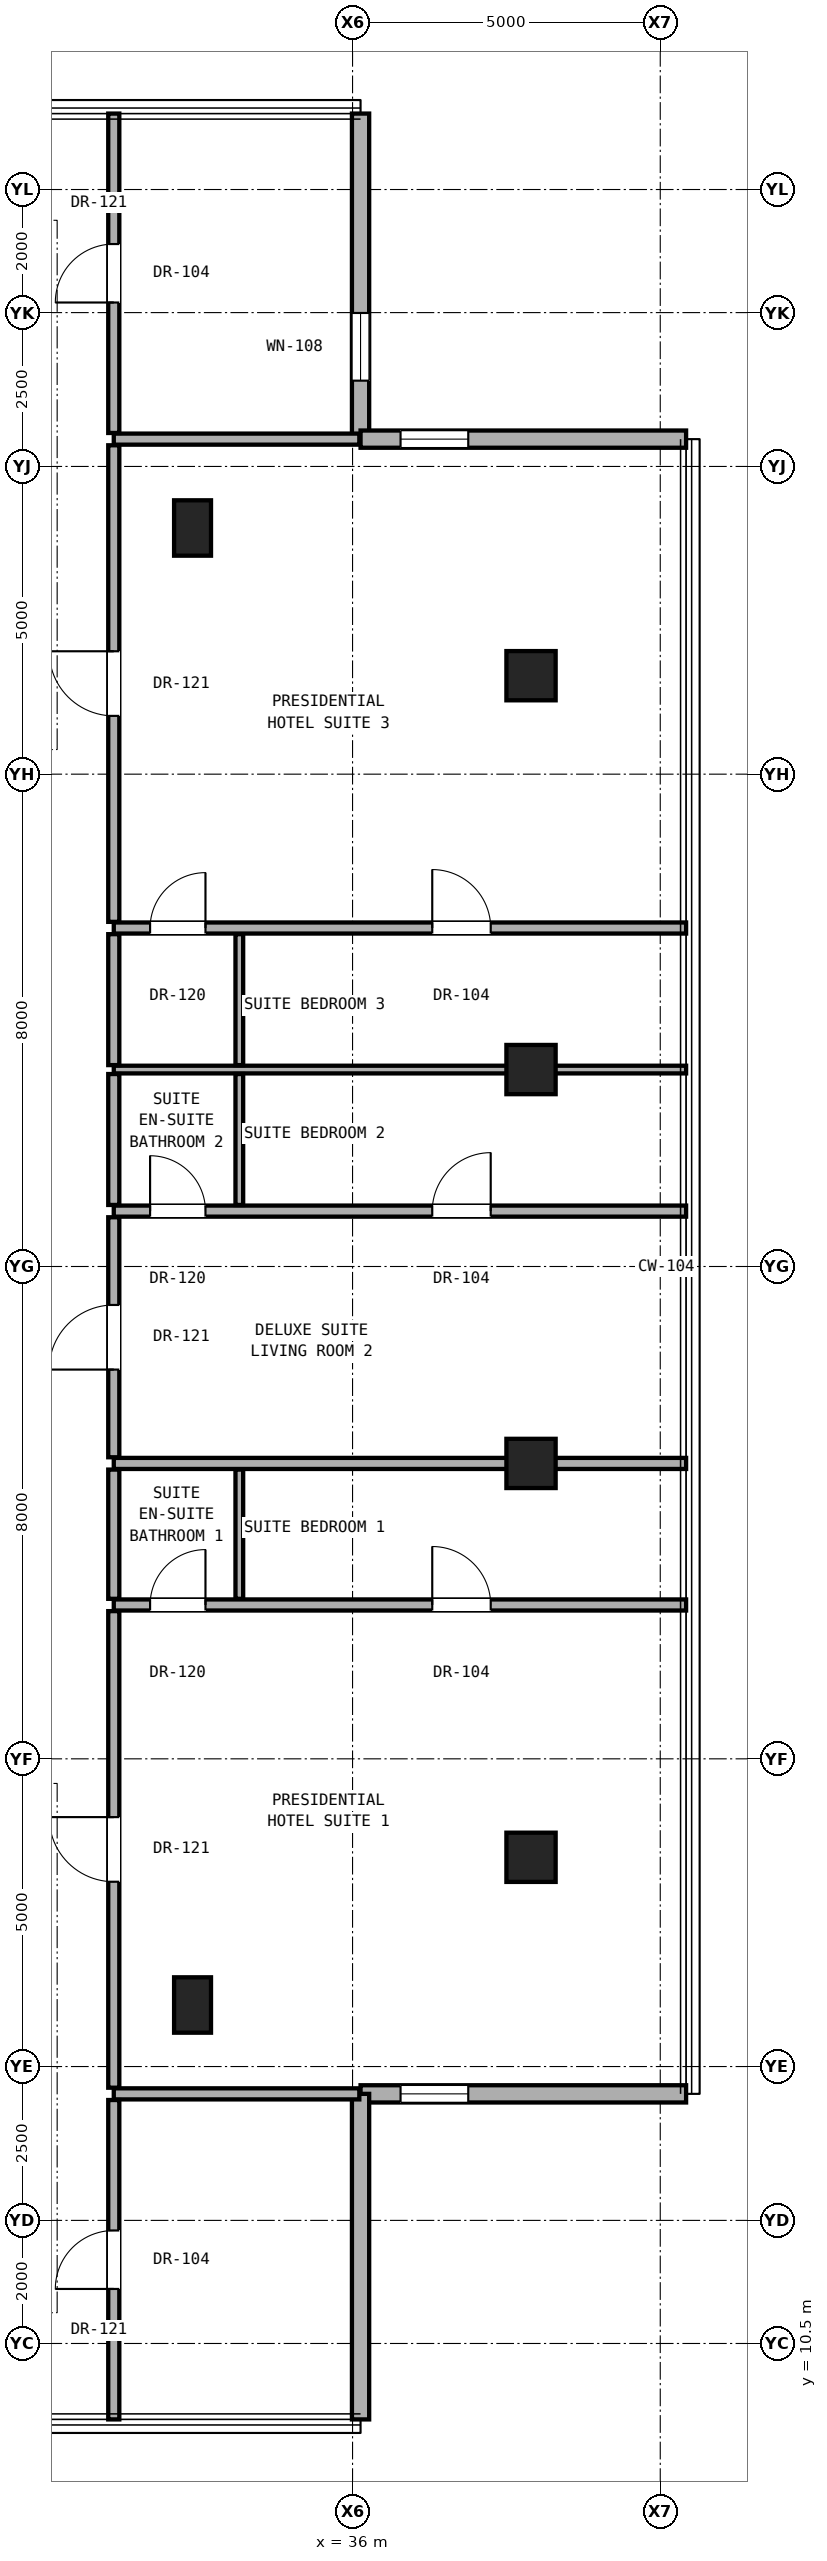
"""IFC4 building model, lengths in metres.
Left out: names, types, materials, properties, quantities, classifications, styles, units other than length and angle.
Written with IfcOpenShell. Run it as: python <this file> out.ifc"""

import sys

from ifc_helpers import new_model, si_unit, direction, frame, frame_2d, origin, origin_2d, place, context, subcontext, project, spatial, rectangle, hollow_rectangle, extrude, element, fill, save


model = new_model("IFC4")
c1 = context("Model", 3, precision=1e-05, world=origin(), true_north=direction((0.0, 1.0)))
c2 = subcontext(c1, "Body", "Model", "MODEL_VIEW")
j1 = project(units=[si_unit("LENGTHUNIT", "METRE"), si_unit("PLANEANGLEUNIT", "RADIAN")], contexts=[c1])
p1 = place(None, origin())
s1 = spatial("IfcSite", under=j1, at=p1, CompositionType="ELEMENT")
p2 = place(p1, origin())
s2 = spatial("IfcBuilding", under=s1, at=p2, CompositionType="ELEMENT")
p3 = place(p2, frame((0.0, 0.0, 229.3)))
s3 = spatial("IfcBuildingStorey", under=s2, at=p3, CompositionType="ELEMENT", Elevation=229.3)
for number, where, z_axis, x_axis in (
    (1, (38.9, 18.4, 0.0), (0.0, 0.0, 1.0), (1.0, 0.0, 0.0)),
    (2, (38.9, 24.8, 0.0), (0.0, 0.0, 1.0), (1.0, 0.0, 0.0)),
    (3, (38.9, 31.2, 0.0), (0.0, 0.0, 1.0), (1.0, 0.0, 0.0)),
    (4, (38.9, 37.6, 0.0), (0.0, 0.0, 1.0), (1.0, 0.0, 0.0)),
):
    element("IfcColumn", number, at=place(p3, frame(where, z_axis=z_axis, x_axis=x_axis)), inside=s3, PredefinedType="COLUMN", context=c2, shape_type="SweptSolid", body=[
        extrude(hollow_rectangle(XDim=0.8, YDim=0.8, WallThickness=0.045, at=origin_2d()), origin(), (0.0, 0.0, 1.0), 3.3),
    ])
for number, where, z_axis, x_axis in (
    (5, (33.4, 16.0, 0.0), (0.0, 0.0, 1.0), (1.0, 0.0, 0.0)),
    (6, (33.4, 40.0, 0.0), (0.0, 0.0, 1.0), (1.0, 0.0, 0.0)),
):
    element("IfcColumn", number, at=place(p3, frame(where, z_axis=z_axis, x_axis=x_axis)), inside=s3, PredefinedType="PILASTER", context=c2, shape_type="SweptSolid", body=[
        extrude(rectangle(XDim=0.6, YDim=0.9, at=origin_2d()), origin(), (0.0, 0.0, 1.0), 3.3),
    ])
p4 = place(p3, frame((36.13, 41.444, 0.0), z_axis=(0.0, 0.0, 1.0), x_axis=(0.0, 1.0, 0.0)))
e7 = element("IfcWall", 7, at=p4, inside=s3, PredefinedType="SOLIDWALL", context=c2, shape_type="SweptSolid", body=[
    extrude(rectangle(XDim=5.29, YDim=0.28, at=frame_2d((2.645, 0.0))), origin(), (0.0, 0.0, 1.0), 3.08),
])
p5 = place(p4, frame((0.95, 0.0, 0.85)))
e8 = element("IfcOpeningElement", 8, at=p5, cuts=e7, PredefinedType="OPENING", context=c2, shape_type="SweptSolid", body=[
    extrude(rectangle(XDim=1.1, YDim=2.0, at=frame_2d((0.55, 1.0))), frame((0.0, 0.15, 0.0), z_axis=(0.0, -1.0, 0.0), x_axis=(1.0, 0.0, 0.0)), (0.0, 0.0, 1.0), 0.3),
])
p6 = place(p3, frame((36.13, 14.556, 0.0), z_axis=(0.0, 0.0, 1.0), x_axis=(1.0, 0.0, 0.0)))
e9 = element("IfcWall", 9, at=p6, inside=s3, PredefinedType="SOLIDWALL", context=c2, shape_type="SweptSolid", body=[
    extrude(rectangle(XDim=5.29, YDim=0.28, at=frame_2d((2.645, 0.0))), origin(), (0.0, 0.0, 1.0), 3.08),
])
p7 = place(p6, frame((0.65, 0.0, 0.85)))
e10 = element("IfcOpeningElement", 10, at=p7, cuts=e9, PredefinedType="OPENING", context=c2, shape_type="SweptSolid", body=[
    extrude(rectangle(XDim=1.1, YDim=2.0, at=frame_2d((0.55, 1.0))), frame((0.0, 0.15, 0.0), z_axis=(0.0, -1.0, 0.0), x_axis=(1.0, 0.0, 0.0)), (0.0, 0.0, 1.0), 0.3),
])
p8 = place(p3, frame((36.13, 9.266, 0.0), z_axis=(0.0, 0.0, 1.0), x_axis=(0.0, 1.0, 0.0)))
e11 = element("IfcWall", 11, at=p8, inside=s3, PredefinedType="SOLIDWALL", context=c2, shape_type="SweptSolid", body=[
    extrude(rectangle(XDim=5.29, YDim=0.28, at=frame_2d((2.645, 0.0))), origin(), (0.0, 0.0, 1.0), 3.08),
])
p9 = place(p3, frame((41.42, 41.444, 0.0), z_axis=(0.0, 0.0, 1.0), x_axis=(-1.0, 0.0, 0.0)))
e12 = element("IfcWall", 12, at=p9, inside=s3, PredefinedType="SOLIDWALL", context=c2, shape_type="SweptSolid", body=[
    extrude(rectangle(XDim=5.29, YDim=0.28, at=frame_2d((2.645, 0.0))), origin(), (0.0, 0.0, 1.0), 3.08),
])
p10 = place(p9, frame((3.54, 0.0, 0.85)))
e13 = element("IfcOpeningElement", 13, at=p10, cuts=e12, PredefinedType="OPENING", context=c2, shape_type="SweptSolid", body=[
    extrude(rectangle(XDim=1.1, YDim=2.0, at=frame_2d((0.55, 1.0))), frame((0.0, 0.15, 0.0), z_axis=(0.0, -1.0, 0.0), x_axis=(1.0, 0.0, 0.0)), (0.0, 0.0, 1.0), 0.3),
])
p11 = place(p3, frame((32.12, 14.556, 0.0), z_axis=(0.0, 0.0, 1.0), x_axis=(1.0, 0.0, 0.0)))
e14 = element("IfcWall", 14, at=p11, inside=s3, PredefinedType="PARTITIONING", context=c2, shape_type="SweptSolid", body=[
    extrude(rectangle(XDim=3.99, YDim=0.18, at=frame_2d((1.995, 0.0))), origin(), (0.0, 0.0, 1.0), 3.1),
])
p12 = place(p3, frame((32.12, 22.5, 0.0), z_axis=(0.0, 0.0, 1.0), x_axis=(1.0, 0.0, 0.0)))
e15 = element("IfcWall", 15, at=p12, inside=s3, PredefinedType="PARTITIONING", context=c2, shape_type="SweptSolid", body=[
    extrude(rectangle(XDim=9.3, YDim=0.18, at=frame_2d((4.65, 0.0))), origin(), (0.0, 0.0, 1.0), 2.319),
])
p13 = place(p12, frame((5.175, 0.0, 0.0)))
e16 = element("IfcOpeningElement", 16, at=p13, cuts=e15, PredefinedType="OPENING", context=c2, shape_type="SweptSolid", body=[
    extrude(rectangle(XDim=0.95, YDim=2.15, at=frame_2d((0.475, 1.075))), frame((0.0, 0.1, 0.0), z_axis=(0.0, -1.0, 0.0), x_axis=(1.0, 0.0, 0.0)), (0.0, 0.0, 1.0), 0.2),
])
p14 = place(p12, frame((0.59, 0.0, 0.0)))
e17 = element("IfcOpeningElement", 17, at=p14, cuts=e15, PredefinedType="OPENING", context=c2, shape_type="SweptSolid", body=[
    extrude(rectangle(XDim=0.9, YDim=2.1, at=frame_2d((0.45, 1.05))), frame((0.0, 0.1, 0.0), z_axis=(0.0, -1.0, 0.0), x_axis=(1.0, 0.0, 0.0)), (0.0, 0.0, 1.0), 0.2),
])
p15 = place(p3, frame((32.12, 24.8, 0.0), z_axis=(0.0, 0.0, 1.0), x_axis=(1.0, 0.0, 0.0)))
e18 = element("IfcWall", 18, at=p15, inside=s3, PredefinedType="PARTITIONING", context=c2, shape_type="SweptSolid", body=[
    extrude(rectangle(XDim=9.3, YDim=0.18, at=frame_2d((4.65, 0.0))), origin(), (0.0, 0.0, 1.0), 2.319),
])
p16 = place(p3, frame((32.12, 28.9, 0.0), z_axis=(0.0, 0.0, 1.0), x_axis=(1.0, 0.0, 0.0)))
e19 = element("IfcWall", 19, at=p16, inside=s3, PredefinedType="PARTITIONING", context=c2, shape_type="SweptSolid", body=[
    extrude(rectangle(XDim=9.3, YDim=0.18, at=frame_2d((4.65, 0.0))), origin(), (0.0, 0.0, 1.0), 2.319),
])
p17 = place(p16, frame((5.175, 0.0, 0.0)))
e20 = element("IfcOpeningElement", 20, at=p17, cuts=e19, PredefinedType="OPENING", context=c2, shape_type="SweptSolid", body=[
    extrude(rectangle(XDim=0.95, YDim=2.15, at=frame_2d((0.475, 1.075))), frame((0.0, 0.1, 0.0), z_axis=(0.0, -1.0, 0.0), x_axis=(1.0, 0.0, 0.0)), (0.0, 0.0, 1.0), 0.2),
])
p18 = place(p16, frame((0.59, 0.0, 0.0)))
e21 = element("IfcOpeningElement", 21, at=p18, cuts=e19, PredefinedType="OPENING", context=c2, shape_type="SweptSolid", body=[
    extrude(rectangle(XDim=0.9, YDim=2.1, at=frame_2d((0.45, 1.05))), frame((0.0, 0.1, 0.0), z_axis=(0.0, -1.0, 0.0), x_axis=(1.0, 0.0, 0.0)), (0.0, 0.0, 1.0), 0.2),
])
p19 = place(p3, frame((32.12, 31.2, 0.0), z_axis=(0.0, 0.0, 1.0), x_axis=(1.0, 0.0, 0.0)))
e22 = element("IfcWall", 22, at=p19, inside=s3, PredefinedType="PARTITIONING", context=c2, shape_type="SweptSolid", body=[
    extrude(rectangle(XDim=9.3, YDim=0.125, at=frame_2d((4.65, 0.0))), origin(), (0.0, 0.0, 1.0), 2.319),
])
p20 = place(p3, frame((32.12, 33.5, 0.0), z_axis=(0.0, 0.0, 1.0), x_axis=(1.0, 0.0, 0.0)))
e23 = element("IfcWall", 23, at=p20, inside=s3, PredefinedType="PARTITIONING", context=c2, shape_type="SweptSolid", body=[
    extrude(rectangle(XDim=9.3, YDim=0.18, at=frame_2d((4.65, 0.0))), origin(), (0.0, 0.0, 1.0), 2.319),
])
p21 = place(p20, frame((5.175, 0.0, 0.0)))
e24 = element("IfcOpeningElement", 24, at=p21, cuts=e23, PredefinedType="OPENING", context=c2, shape_type="SweptSolid", body=[
    extrude(rectangle(XDim=0.95, YDim=2.15, at=frame_2d((0.475, 1.075))), frame((0.0, 0.1, 0.0), z_axis=(0.0, -1.0, 0.0), x_axis=(1.0, 0.0, 0.0)), (0.0, 0.0, 1.0), 0.2),
])
p22 = place(p20, frame((0.59, 0.0, 0.0)))
e25 = element("IfcOpeningElement", 25, at=p22, cuts=e23, PredefinedType="OPENING", context=c2, shape_type="SweptSolid", body=[
    extrude(rectangle(XDim=0.9, YDim=2.1, at=frame_2d((0.45, 1.05))), frame((0.0, 0.1, 0.0), z_axis=(0.0, -1.0, 0.0), x_axis=(1.0, 0.0, 0.0)), (0.0, 0.0, 1.0), 0.2),
])
p23 = place(p3, frame((32.12, 41.444, 0.0), z_axis=(0.0, 0.0, 1.0), x_axis=(1.0, 0.0, 0.0)))
e26 = element("IfcWall", 26, at=p23, inside=s3, PredefinedType="PARTITIONING", context=c2, shape_type="SweptSolid", body=[
    extrude(rectangle(XDim=3.99, YDim=0.18, at=frame_2d((1.995, 0.0))), origin(), (0.0, 0.0, 1.0), 3.1),
])
p24 = place(p3, frame((32.12, 9.266, 0.0), z_axis=(0.0, 0.0, 1.0), x_axis=(0.0, 1.0, 0.0)))
e27 = element("IfcWall", 27, at=p24, inside=s3, PredefinedType="PARTITIONING", context=c2, shape_type="SweptSolid", body=[
    extrude(rectangle(XDim=5.19, YDim=0.18, at=frame_2d((2.595, 0.0))), origin(), (0.0, 0.0, 1.0), 3.1),
])
p25 = place(p24, frame((2.12, 0.0, 0.0)))
e28 = element("IfcOpeningElement", 28, at=p25, cuts=e27, PredefinedType="OPENING", context=c2, shape_type="SweptSolid", body=[
    extrude(rectangle(XDim=0.95, YDim=2.15, at=frame_2d((0.475, 1.075))), frame((0.0, 0.1, 0.0), z_axis=(0.0, -1.0, 0.0), x_axis=(1.0, 0.0, 0.0)), (0.0, 0.0, 1.0), 0.2),
])
p26 = place(p3, frame((32.12, 14.656, 0.0), z_axis=(0.0, 0.0, 1.0), x_axis=(0.0, 1.0, 0.0)))
e29 = element("IfcWall", 29, at=p26, inside=s3, PredefinedType="PARTITIONING", context=c2, shape_type="SweptSolid", body=[
    extrude(rectangle(XDim=7.744, YDim=0.18, at=frame_2d((3.872, 0.0))), origin(), (0.0, 0.0, 1.0), 2.492),
])
p27 = place(p26, frame((3.347, 0.0, 0.0)))
e30 = element("IfcOpeningElement", 30, at=p27, cuts=e29, PredefinedType="OPENING", context=c2, shape_type="SweptSolid", body=[
    extrude(rectangle(XDim=1.05, YDim=2.2, at=frame_2d((0.525, 1.1))), frame((0.0, 0.1, 0.0), z_axis=(0.0, -1.0, 0.0), x_axis=(1.0, 0.0, 0.0)), (0.0, 0.0, 1.0), 0.2),
])
p28 = place(p3, frame((32.12, 22.6, 0.0), z_axis=(0.0, 0.0, 1.0), x_axis=(0.0, 1.0, 0.0)))
e31 = element("IfcWall", 31, at=p28, inside=s3, PredefinedType="PARTITIONING", context=c2, shape_type="SweptSolid", body=[
    extrude(rectangle(XDim=2.1, YDim=0.18, at=frame_2d((1.05, 0.0))), origin(), (0.0, 0.0, 1.0), 2.396),
])
p29 = place(p3, frame((32.12, 24.9, 0.0), z_axis=(0.0, 0.0, 1.0), x_axis=(0.0, 1.0, 0.0)))
e32 = element("IfcWall", 32, at=p29, inside=s3, PredefinedType="PARTITIONING", context=c2, shape_type="SweptSolid", body=[
    extrude(rectangle(XDim=3.9, YDim=0.18, at=frame_2d((1.95, 0.0))), origin(), (0.0, 0.0, 1.0), 2.396),
])
p30 = place(p29, frame((1.425, 0.0, 0.0)))
e33 = element("IfcOpeningElement", 33, at=p30, cuts=e32, PredefinedType="OPENING", context=c2, shape_type="SweptSolid", body=[
    extrude(rectangle(XDim=1.05, YDim=2.2, at=frame_2d((0.525, 1.1))), frame((0.0, 0.1, 0.0), z_axis=(0.0, -1.0, 0.0), x_axis=(1.0, 0.0, 0.0)), (0.0, 0.0, 1.0), 0.2),
])
for number, where, z_axis, x_axis in (
    (34, (32.12, 29.0, 0.0), (0.0, 0.0, 1.0), (0.0, 1.0, 0.0)),
    (35, (32.12, 31.272, 0.0), (0.0, 0.0, 1.0), (0.0, 1.0, 0.0)),
):
    element("IfcWall", number, at=place(p3, frame(where, z_axis=z_axis, x_axis=x_axis)), inside=s3, PredefinedType="PARTITIONING", context=c2, shape_type="SweptSolid", body=[
        extrude(rectangle(XDim=2.127, YDim=0.18, at=frame_2d((1.064, 0.0))), origin(), (0.0, 0.0, 1.0), 2.396),
    ])
p31 = place(p3, frame((32.12, 33.6, 0.0), z_axis=(0.0, 0.0, 1.0), x_axis=(0.0, 1.0, 0.0)))
e36 = element("IfcWall", 36, at=p31, inside=s3, PredefinedType="PARTITIONING", context=c2, shape_type="SweptSolid", body=[
    extrude(rectangle(XDim=7.744, YDim=0.18, at=frame_2d((3.872, 0.0))), origin(), (0.0, 0.0, 1.0), 2.492),
])
p32 = place(p31, frame((3.347, 0.0, 0.0)))
e37 = element("IfcOpeningElement", 37, at=p32, cuts=e36, PredefinedType="OPENING", context=c2, shape_type="SweptSolid", body=[
    extrude(rectangle(XDim=1.05, YDim=2.2, at=frame_2d((0.525, 1.1))), frame((0.0, 0.1, 0.0), z_axis=(0.0, -1.0, 0.0), x_axis=(1.0, 0.0, 0.0)), (0.0, 0.0, 1.0), 0.2),
])
p33 = place(p3, frame((32.12, 41.544, 0.0), z_axis=(0.0, 0.0, 1.0), x_axis=(0.0, 1.0, 0.0)))
e38 = element("IfcWall", 38, at=p33, inside=s3, PredefinedType="PARTITIONING", context=c2, shape_type="SweptSolid", body=[
    extrude(rectangle(XDim=5.19, YDim=0.18, at=frame_2d((2.595, 0.0))), origin(), (0.0, 0.0, 1.0), 3.1),
])
p34 = place(p33, frame((2.12, 0.0, 0.0)))
e39 = element("IfcOpeningElement", 39, at=p34, cuts=e38, PredefinedType="OPENING", context=c2, shape_type="SweptSolid", body=[
    extrude(rectangle(XDim=0.95, YDim=2.15, at=frame_2d((0.475, 1.075))), frame((0.0, 0.1, 0.0), z_axis=(0.0, -1.0, 0.0), x_axis=(1.0, 0.0, 0.0)), (0.0, 0.0, 1.0), 0.2),
])
p35 = place(p3, frame((34.16, 22.6, 0.0), z_axis=(0.0, 0.0, 1.0), x_axis=(0.0, 1.0, 0.0)))
e40 = element("IfcWall", 40, at=p35, inside=s3, PredefinedType="PARTITIONING", context=c2, shape_type="SweptSolid", body=[
    extrude(rectangle(XDim=2.1, YDim=0.125, at=frame_2d((1.05, 0.0))), origin(), (0.0, 0.0, 1.0), 2.396),
])
for number, where, z_axis, x_axis in (
    (41, (34.16, 29.0, 0.0), (0.0, 0.0, 1.0), (0.0, 1.0, 0.0)),
    (42, (34.16, 31.272, 0.0), (0.0, 0.0, 1.0), (0.0, 1.0, 0.0)),
):
    element("IfcWall", number, at=place(p3, frame(where, z_axis=z_axis, x_axis=x_axis)), inside=s3, PredefinedType="PARTITIONING", context=c2, shape_type="SweptSolid", body=[
        extrude(rectangle(XDim=2.127, YDim=0.125, at=frame_2d((1.064, 0.0))), origin(), (0.0, 0.0, 1.0), 2.396),
    ])
p36 = place(p5, origin())
e43 = element("IfcWindow", 43, at=p36, inside=s3, PartitioningType="SINGLE_PANEL", PredefinedType="WINDOW", context=c2, shape_type="SweptSolid", body=[
    extrude(rectangle(XDim=1.1, YDim=2.0, at=frame_2d((0.55, 1.0))), frame((0.0, 0.03, 0.0), z_axis=(0.0, -1.0, 0.0), x_axis=(1.0, 0.0, 0.0)), (0.0, 0.0, 1.0), 0.06),
])
fill(e8, e43)
p37 = place(p7, origin())
e44 = element("IfcWindow", 44, at=p37, inside=s3, PartitioningType="SINGLE_PANEL", PredefinedType="WINDOW", context=c2, shape_type="SweptSolid", body=[
    extrude(rectangle(XDim=1.1, YDim=2.0, at=frame_2d((0.55, 1.0))), frame((0.0, 0.03, 0.0), z_axis=(0.0, -1.0, 0.0), x_axis=(1.0, 0.0, 0.0)), (0.0, 0.0, 1.0), 0.06),
])
fill(e10, e44)
p38 = place(p10, origin())
e45 = element("IfcWindow", 45, at=p38, inside=s3, PartitioningType="SINGLE_PANEL", PredefinedType="WINDOW", context=c2, shape_type="SweptSolid", body=[
    extrude(rectangle(XDim=1.1, YDim=2.0, at=frame_2d((0.55, 1.0))), frame((0.0, 0.03, 0.0), z_axis=(0.0, -1.0, 0.0), x_axis=(1.0, 0.0, 0.0)), (0.0, 0.0, 1.0), 0.06),
])
fill(e13, e45)
p39 = place(p27, origin())
e46 = element("IfcDoor", 46, at=p39, inside=s3, OperationType="SINGLE_SWING_RIGHT", PredefinedType="DOOR", context=c2, shape_type="SweptSolid", body=[
    extrude(rectangle(XDim=1.05, YDim=2.2, at=frame_2d((0.525, 1.1))), frame((0.0, 0.025, 0.0), z_axis=(0.0, -1.0, 0.0), x_axis=(1.0, 0.0, 0.0)), (0.0, 0.0, 1.0), 0.05),
])
fill(e30, e46)
p40 = place(p13, origin())
e47 = element("IfcDoor", 47, at=p40, inside=s3, OperationType="SINGLE_SWING_LEFT", PredefinedType="DOOR", context=c2, shape_type="SweptSolid", body=[
    extrude(rectangle(XDim=0.95, YDim=2.15, at=frame_2d((0.475, 1.075))), frame((0.0, 0.025, 0.0), z_axis=(0.0, -1.0, 0.0), x_axis=(1.0, 0.0, 0.0)), (0.0, 0.0, 1.0), 0.05),
])
fill(e16, e47)
p41 = place(p14, origin())
e48 = element("IfcDoor", 48, at=p41, inside=s3, OperationType="SINGLE_SWING_RIGHT", PredefinedType="DOOR", context=c2, shape_type="SweptSolid", body=[
    extrude(rectangle(XDim=0.9, YDim=2.1, at=frame_2d((0.45, 1.05))), frame((0.0, 0.025, 0.0), z_axis=(0.0, -1.0, 0.0), x_axis=(1.0, 0.0, 0.0)), (0.0, 0.0, 1.0), 0.05),
])
fill(e17, e48)
p42 = place(p30, origin())
e49 = element("IfcDoor", 49, at=p42, inside=s3, OperationType="SINGLE_SWING_LEFT", PredefinedType="DOOR", context=c2, shape_type="SweptSolid", body=[
    extrude(rectangle(XDim=1.05, YDim=2.2, at=frame_2d((0.525, 1.1))), frame((0.0, 0.025, 0.0), z_axis=(0.0, -1.0, 0.0), x_axis=(1.0, 0.0, 0.0)), (0.0, 0.0, 1.0), 0.05),
])
fill(e33, e49)
p43 = place(p17, origin())
e50 = element("IfcDoor", 50, at=p43, inside=s3, OperationType="SINGLE_SWING_RIGHT", PredefinedType="DOOR", context=c2, shape_type="SweptSolid", body=[
    extrude(rectangle(XDim=0.95, YDim=2.15, at=frame_2d((0.475, 1.075))), frame((0.0, 0.025, 0.0), z_axis=(0.0, -1.0, 0.0), x_axis=(1.0, 0.0, 0.0)), (0.0, 0.0, 1.0), 0.05),
])
fill(e20, e50)
p44 = place(p18, origin())
e51 = element("IfcDoor", 51, at=p44, inside=s3, OperationType="SINGLE_SWING_LEFT", PredefinedType="DOOR", context=c2, shape_type="SweptSolid", body=[
    extrude(rectangle(XDim=0.9, YDim=2.1, at=frame_2d((0.45, 1.05))), frame((0.0, 0.025, 0.0), z_axis=(0.0, -1.0, 0.0), x_axis=(1.0, 0.0, 0.0)), (0.0, 0.0, 1.0), 0.05),
])
fill(e21, e51)
p45 = place(p32, origin())
e52 = element("IfcDoor", 52, at=p45, inside=s3, OperationType="SINGLE_SWING_RIGHT", PredefinedType="DOOR", context=c2, shape_type="SweptSolid", body=[
    extrude(rectangle(XDim=1.05, YDim=2.2, at=frame_2d((0.525, 1.1))), frame((0.0, 0.025, 0.0), z_axis=(0.0, -1.0, 0.0), x_axis=(1.0, 0.0, 0.0)), (0.0, 0.0, 1.0), 0.05),
])
fill(e37, e52)
p46 = place(p21, origin())
e53 = element("IfcDoor", 53, at=p46, inside=s3, OperationType="SINGLE_SWING_LEFT", PredefinedType="DOOR", context=c2, shape_type="SweptSolid", body=[
    extrude(rectangle(XDim=0.95, YDim=2.15, at=frame_2d((0.475, 1.075))), frame((0.0, 0.025, 0.0), z_axis=(0.0, -1.0, 0.0), x_axis=(1.0, 0.0, 0.0)), (0.0, 0.0, 1.0), 0.05),
])
fill(e24, e53)
p47 = place(p22, origin())
e54 = element("IfcDoor", 54, at=p47, inside=s3, OperationType="SINGLE_SWING_RIGHT", PredefinedType="DOOR", context=c2, shape_type="SweptSolid", body=[
    extrude(rectangle(XDim=0.9, YDim=2.1, at=frame_2d((0.45, 1.05))), frame((0.0, 0.025, 0.0), z_axis=(0.0, -1.0, 0.0), x_axis=(1.0, 0.0, 0.0)), (0.0, 0.0, 1.0), 0.05),
])
fill(e25, e54)
p48 = place(p25, origin())
e55 = element("IfcDoor", 55, at=p48, inside=s3, OperationType="SINGLE_SWING_LEFT", PredefinedType="DOOR", context=c2, shape_type="SweptSolid", body=[
    extrude(rectangle(XDim=0.95, YDim=2.15, at=frame_2d((0.475, 1.075))), frame((0.0, 0.025, 0.0), z_axis=(0.0, -1.0, 0.0), x_axis=(1.0, 0.0, 0.0)), (0.0, 0.0, 1.0), 0.05),
])
fill(e28, e55)
p49 = place(p34, origin())
e56 = element("IfcDoor", 56, at=p49, inside=s3, OperationType="SINGLE_SWING_LEFT", PredefinedType="DOOR", context=c2, shape_type="SweptSolid", body=[
    extrude(rectangle(XDim=0.95, YDim=2.15, at=frame_2d((0.475, 1.075))), frame((0.0, 0.025, 0.0), z_axis=(0.0, -1.0, 0.0), x_axis=(1.0, 0.0, 0.0)), (0.0, 0.0, 1.0), 0.05),
])
fill(e39, e56)
save(model, sys.argv[1])
